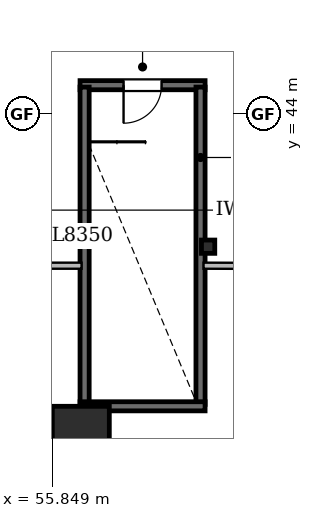
"""IFC4 building model, lengths in metres.
Left out: names, types, materials, properties, quantities, classifications, styles, units other than length and angle.
Written with IfcOpenShell. Run it as: python <this file> out.ifc"""

import sys

from ifc_helpers import new_model, si_unit, direction, frame, frame_2d, origin, origin_2d, place, context, subcontext, project, spatial, rectangle, i_section, extrude, element, fill, save


model = new_model("IFC4")
c1 = context("Model", 3, precision=1e-05, world=origin(), true_north=direction((0.0, 1.0)))
c2 = subcontext(c1, "Body", "Model", "MODEL_VIEW")
j1 = project(units=[si_unit("LENGTHUNIT", "METRE"), si_unit("PLANEANGLEUNIT", "RADIAN")], contexts=[c1])
p1 = place(None, origin())
s1 = spatial("IfcSite", under=j1, at=p1, CompositionType="ELEMENT")
p2 = place(p1, origin())
s2 = spatial("IfcBuilding", under=s1, at=p2, CompositionType="ELEMENT")
p3 = place(p2, frame((0.0, 0.0, 24.0)))
s3 = spatial("IfcBuildingStorey", under=s2, at=p3, CompositionType="ELEMENT", Elevation=24.0)
p4 = place(p3, frame((56.6, 35.8, 0.0), z_axis=(0.0, 0.0, 1.0), x_axis=(1.0, 0.0, 0.0)))
e1 = element("IfcColumn", 1, at=p4, inside=s3, PredefinedType="COLUMN", context=c2, shape_type="SweptSolid", body=[
    extrude(rectangle(XDim=1.5, YDim=1.0, at=origin_2d()), origin(), (0.0, 0.0, 1.0), 5.2),
])
p5 = place(p3, frame((59.95, 40.5, 0.0), z_axis=(0.0, 0.0, 1.0), x_axis=(1.0, 0.0, 0.0)))
e2 = element("IfcColumn", 2, at=p5, inside=s3, PredefinedType="PILASTER", context=c2, shape_type="SweptSolid", body=[
    extrude(i_section(OverallWidth=0.35, OverallDepth=0.35, WebThickness=0.012, FlangeThickness=0.019, FilletRadius=0.02, at=origin_2d()), origin(), (0.0, 0.0, 1.0), 5.2),
])
p6 = place(p3, frame((56.58, 44.75, 0.0), z_axis=(0.0, 0.0, 1.0), x_axis=(1.0, 0.0, 0.0)))
e3 = element("IfcWall", 3, at=p6, inside=s3, PredefinedType="SHEAR", context=c2, shape_type="SweptSolid", body=[
    extrude(rectangle(XDim=3.29, YDim=0.24, at=frame_2d((1.645, 0.0))), origin(), (0.0, 0.0, 1.0), 4.925),
])
p7 = place(p6, frame((1.145, 0.0, 0.0)))
e4 = element("IfcOpeningElement", 4, at=p7, cuts=e3, PredefinedType="OPENING", context=c2, shape_type="SweptSolid", body=[
    extrude(rectangle(XDim=1.0, YDim=2.15, at=frame_2d((0.5, 1.075))), frame((0.0, 0.13, 0.0), z_axis=(0.0, -1.0, 0.0), x_axis=(1.0, 0.0, 0.0)), (0.0, 0.0, 1.0), 0.26),
])
for number, where, z_axis, x_axis in (
    (5, (56.7, 36.35, 0.0), (0.0, 0.0, 1.0), (0.0, 1.0, 0.0)),
    (6, (59.75, 36.35, 0.0), (0.0, 0.0, 1.0), (0.0, 1.0, 0.0)),
):
    element("IfcWall", number, at=place(p3, frame(where, z_axis=z_axis, x_axis=x_axis)), inside=s3, PredefinedType="SHEAR", context=c2, shape_type="SweptSolid", body=[
        extrude(rectangle(XDim=8.35, YDim=0.24, at=frame_2d((4.175, 0.0))), origin(), (0.0, 0.0, 1.0), 4.925),
    ])
p8 = place(p3, frame((56.58, 36.3, 0.0), z_axis=(0.0, 0.0, 1.0), x_axis=(1.0, 0.0, 0.0)))
e7 = element("IfcWall", 7, at=p8, inside=s3, PredefinedType="SHEAR", context=c2, shape_type="SweptSolid", body=[
    extrude(rectangle(XDim=3.29, YDim=0.24, at=frame_2d((1.645, 0.0))), origin(), (0.0, 0.0, 1.0), 4.925),
])
p9 = place(p3, frame((70.369, 39.967, 0.0), z_axis=(0.0, 0.0, 1.0), x_axis=(-0.999995109755, 0.003127373684, 0.0)))
e8 = element("IfcWall", 8, at=p9, inside=s3, PredefinedType="SOLIDWALL", context=c2, shape_type="SweptSolid", body=[
    extrude(rectangle(XDim=10.539, YDim=0.16, at=frame_2d((5.27, 0.0))), origin(), (0.0, 0.0, 1.0), 2.913),
])
p10 = place(p3, frame((56.62, 40.0, 0.0), z_axis=(0.0, 0.0, 1.0), x_axis=(-1.0, 0.0, 0.0)))
e9 = element("IfcWall", 9, at=p10, inside=s3, PredefinedType="SOLIDWALL", context=c2, shape_type="SweptSolid", body=[
    extrude(rectangle(XDim=1.94, YDim=0.16, at=frame_2d((0.97, 0.0))), origin(), (0.0, 0.0, 1.0), 4.263),
])
p11 = place(p7, frame((1.0, 0.0, 0.0), z_axis=(0.0, 0.0, 1.0), x_axis=(-1.0, 0.0, 0.0)))
e10 = element("IfcDoor", 10, at=p11, inside=s3, OperationType="SINGLE_SWING_LEFT", PredefinedType="DOOR", context=c2, shape_type="SweptSolid", body=[
    extrude(rectangle(XDim=1.0, YDim=2.15, at=frame_2d((0.5, 1.075))), frame((0.0, 0.025, 0.0), z_axis=(0.0, -1.0, 0.0), x_axis=(1.0, 0.0, 0.0)), (0.0, 0.0, 1.0), 0.05),
])
fill(e4, e10)
save(model, sys.argv[1])
